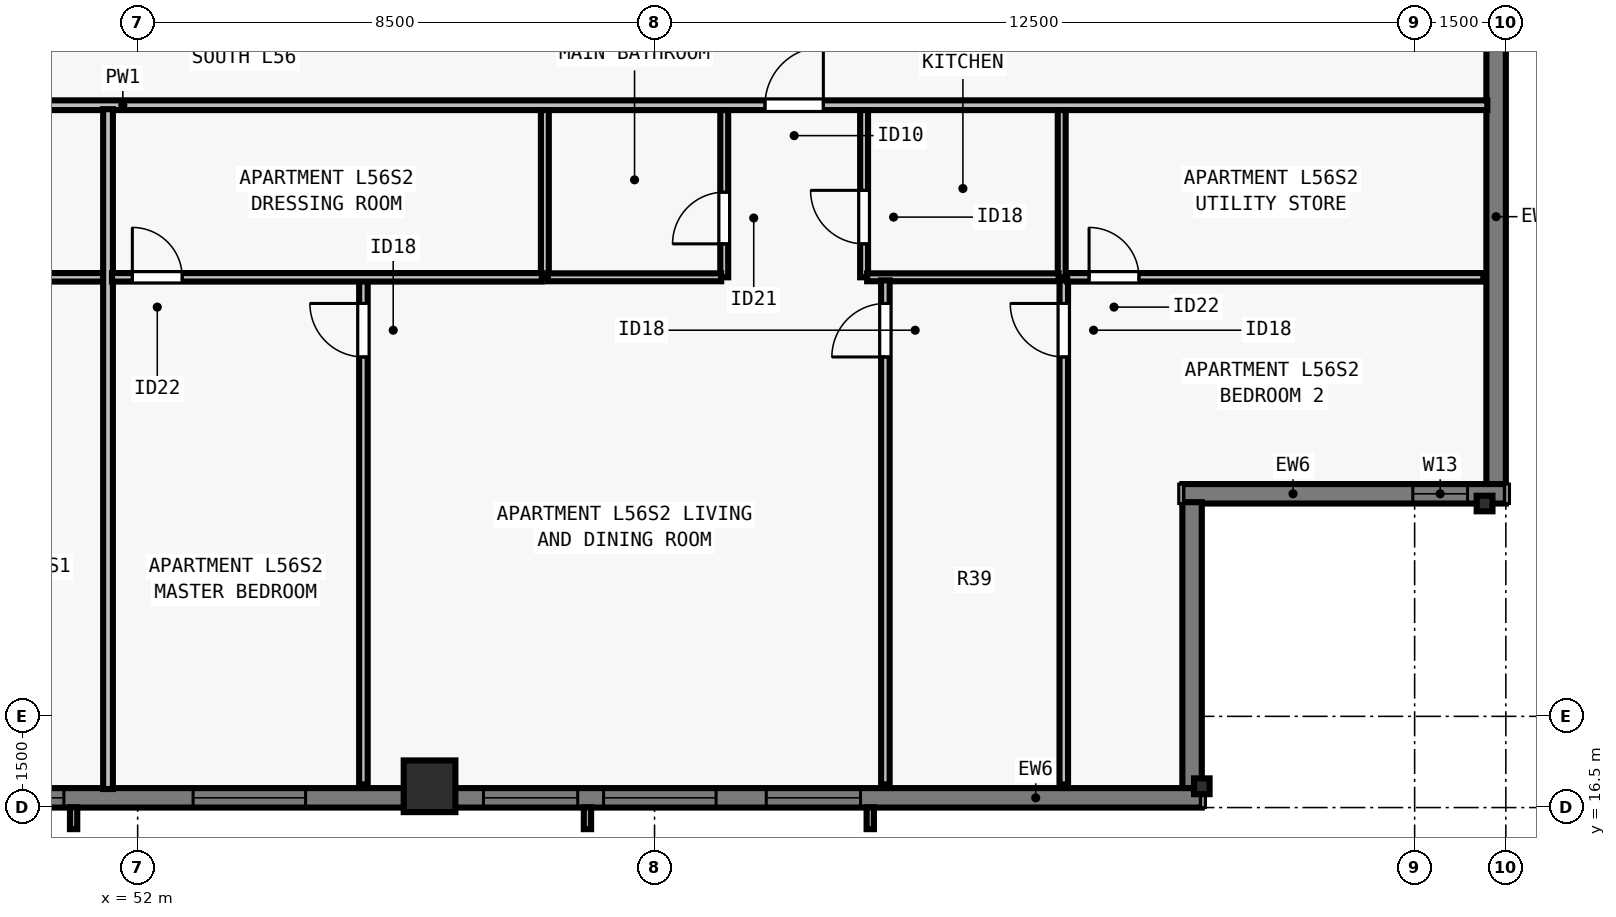
"""IFC4 building model, lengths in metres.
Left out: names, types, materials, properties, quantities, classifications, styles, units other than length and angle.
Written with IfcOpenShell. Run it as: python <this file> out.ifc"""

import sys

from ifc_helpers import new_model, si_unit, direction, frame, frame_2d, origin, origin_2d, place, context, subcontext, project, spatial, rectangle, i_section, extrude, element, fill, save


model = new_model("IFC4")
c1 = context("Model", 3, precision=1e-05, world=origin(), true_north=direction((0.0, 1.0)))
c2 = subcontext(c1, "Body", "Model", "MODEL_VIEW")
j1 = project(units=[si_unit("LENGTHUNIT", "METRE"), si_unit("PLANEANGLEUNIT", "RADIAN")], contexts=[c1])
p1 = place(None, origin())
s1 = spatial("IfcSite", under=j1, at=p1, CompositionType="ELEMENT")
p2 = place(p1, origin())
s2 = spatial("IfcBuilding", under=s1, at=p2, CompositionType="ELEMENT")
p3 = place(p2, frame((0.0, 0.0, 206.0)))
s3 = spatial("IfcBuildingStorey", under=s2, at=p3, CompositionType="ELEMENT", Elevation=206.0)
p4 = place(p3, frame((56.8, 16.85, 0.0), z_axis=(0.0, 0.0, 1.0), x_axis=(1.0, 0.0, 0.0)))
e1 = element("IfcColumn", 1, at=p4, inside=s3, PredefinedType="COLUMN", context=c2, shape_type="SweptSolid", body=[
    extrude(rectangle(XDim=0.85, YDim=0.85, at=origin_2d()), origin(), (0.0, 0.0, 1.0), 3.5),
])
for number, where, z_axis, x_axis in (
    (2, (69.5, 16.85, 0.0), (0.0, 0.0, 1.0), (1.0, 0.0, 0.0)),
    (3, (74.15, 21.5, 0.0), (0.0, 0.0, 1.0), (0.0, 1.0, 0.0)),
):
    element("IfcColumn", number, at=place(p3, frame(where, z_axis=z_axis, x_axis=x_axis)), inside=s3, PredefinedType="COLUMN", context=c2, shape_type="SweptSolid", body=[
        extrude(i_section(OverallWidth=0.256, OverallDepth=0.26, WebThickness=0.01, FlangeThickness=0.017, FilletRadius=0.013, at=origin_2d()), origin(), (0.0, 0.0, 1.0), 3.5),
    ])
p5 = place(p3, frame((74.34, 56.5, 0.0), z_axis=(0.0, 0.0, 1.0), x_axis=(0.0, -1.0, 0.0)))
e4 = element("IfcWall", 4, at=p5, inside=s3, PredefinedType="SOLIDWALL", context=c2, shape_type="SweptSolid", body=[
    extrude(rectangle(XDim=34.702, YDim=0.32, at=frame_2d((17.351, 0.0))), origin(), (0.0, 0.0, 1.0), 3.29),
])
p6 = place(p5, frame((4.312, 0.0, 0.8)))
e5 = element("IfcOpeningElement", 5, at=p6, cuts=e4, PredefinedType="OPENING", context=c2, shape_type="SweptSolid", body=[
    extrude(rectangle(XDim=1.55, YDim=1.678, at=frame_2d((0.775, 0.839))), frame((0.0, 0.17, 0.0), z_axis=(0.0, -1.0, 0.0), x_axis=(1.0, 0.0, 0.0)), (0.0, 0.0, 1.0), 0.34),
])
p7 = place(p5, frame((9.238, 0.0, 0.8)))
e6 = element("IfcOpeningElement", 6, at=p7, cuts=e4, PredefinedType="OPENING", context=c2, shape_type="SweptSolid", body=[
    extrude(rectangle(XDim=1.85, YDim=1.678, at=frame_2d((0.925, 0.839))), frame((0.0, 0.17, 0.0), z_axis=(0.0, -1.0, 0.0), x_axis=(1.0, 0.0, 0.0)), (0.0, 0.0, 1.0), 0.34),
])
p8 = place(p5, frame((14.738, 0.0, 0.8)))
e7 = element("IfcOpeningElement", 7, at=p8, cuts=e4, PredefinedType="OPENING", context=c2, shape_type="SweptSolid", body=[
    extrude(rectangle(XDim=1.85, YDim=1.678, at=frame_2d((0.925, 0.839))), frame((0.0, 0.17, 0.0), z_axis=(0.0, -1.0, 0.0), x_axis=(1.0, 0.0, 0.0)), (0.0, 0.0, 1.0), 0.34),
])
p9 = place(p5, frame((18.264, 0.0, 0.8)))
e8 = element("IfcOpeningElement", 8, at=p9, cuts=e4, PredefinedType="OPENING", context=c2, shape_type="SweptSolid", body=[
    extrude(rectangle(XDim=1.55, YDim=1.678, at=frame_2d((0.775, 0.839))), frame((0.0, 0.17, 0.0), z_axis=(0.0, -1.0, 0.0), x_axis=(1.0, 0.0, 0.0)), (0.0, 0.0, 1.0), 0.34),
])
p10 = place(p5, frame((24.164, 0.0, 0.8)))
e9 = element("IfcOpeningElement", 9, at=p10, cuts=e4, PredefinedType="OPENING", context=c2, shape_type="SweptSolid", body=[
    extrude(rectangle(XDim=1.55, YDim=1.678, at=frame_2d((0.775, 0.839))), frame((0.0, 0.17, 0.0), z_axis=(0.0, -1.0, 0.0), x_axis=(1.0, 0.0, 0.0)), (0.0, 0.0, 1.0), 0.34),
])
p11 = place(p3, frame((74.5, 21.66, 0.0), z_axis=(0.0, 0.0, 1.0), x_axis=(-1.0, 0.0, 0.0)))
e10 = element("IfcWall", 10, at=p11, inside=s3, PredefinedType="SOLIDWALL", context=c2, shape_type="SweptSolid", body=[
    extrude(rectangle(XDim=5.32, YDim=0.32, at=frame_2d((2.66, 0.0))), origin(), (0.0, 0.0, 1.0), 3.29),
])
p12 = place(p11, frame((0.63, 0.0, 0.8)))
e11 = element("IfcOpeningElement", 11, at=p12, cuts=e10, PredefinedType="OPENING", context=c2, shape_type="SweptSolid", body=[
    extrude(rectangle(XDim=0.9, YDim=1.678, at=frame_2d((0.45, 0.839))), frame((0.0, 0.17, 0.0), z_axis=(0.0, -1.0, 0.0), x_axis=(1.0, 0.0, 0.0)), (0.0, 0.0, 1.0), 0.34),
])
p13 = place(p3, frame((69.34, 21.522, 0.0), z_axis=(0.0, 0.0, 1.0), x_axis=(0.0, -1.0, 0.0)))
e12 = element("IfcWall", 12, at=p13, inside=s3, PredefinedType="SOLIDWALL", context=c2, shape_type="SweptSolid", body=[
    extrude(rectangle(XDim=4.724, YDim=0.32, at=frame_2d((2.362, 0.0))), origin(), (0.0, 0.0, 1.0), 3.29),
])
p14 = place(p3, frame((69.5, 16.66, 0.0), z_axis=(0.0, 0.0, 1.0), x_axis=(-1.0, 0.0, 0.0)))
e13 = element("IfcWall", 13, at=p14, inside=s3, PredefinedType="SOLIDWALL", context=c2, shape_type="SweptSolid", body=[
    extrude(rectangle(XDim=34.702, YDim=0.32, at=frame_2d((17.351, 0.0))), origin(), (0.0, 0.0, 1.0), 3.29),
])
p15 = place(p14, frame((5.613, 0.0, 0.8)))
e14 = element("IfcOpeningElement", 14, at=p15, cuts=e13, PredefinedType="OPENING", context=c2, shape_type="SweptSolid", body=[
    extrude(rectangle(XDim=1.55, YDim=1.678, at=frame_2d((0.775, 0.839))), frame((0.0, 0.17, 0.0), z_axis=(0.0, -1.0, 0.0), x_axis=(1.0, 0.0, 0.0)), (0.0, 0.0, 1.0), 0.34),
])
p16 = place(p14, frame((7.988, 0.0, 0.8)))
e15 = element("IfcOpeningElement", 15, at=p16, cuts=e13, PredefinedType="OPENING", context=c2, shape_type="SweptSolid", body=[
    extrude(rectangle(XDim=1.85, YDim=1.678, at=frame_2d((0.925, 0.839))), frame((0.0, 0.17, 0.0), z_axis=(0.0, -1.0, 0.0), x_axis=(1.0, 0.0, 0.0)), (0.0, 0.0, 1.0), 0.34),
])
p17 = place(p14, frame((10.263, 0.0, 0.8)))
e16 = element("IfcOpeningElement", 16, at=p17, cuts=e13, PredefinedType="OPENING", context=c2, shape_type="SweptSolid", body=[
    extrude(rectangle(XDim=1.55, YDim=1.678, at=frame_2d((0.775, 0.839))), frame((0.0, 0.17, 0.0), z_axis=(0.0, -1.0, 0.0), x_axis=(1.0, 0.0, 0.0)), (0.0, 0.0, 1.0), 0.34),
])
p18 = place(p14, frame((14.738, 0.0, 0.8)))
e17 = element("IfcOpeningElement", 17, at=p18, cuts=e13, PredefinedType="OPENING", context=c2, shape_type="SweptSolid", body=[
    extrude(rectangle(XDim=1.85, YDim=1.678, at=frame_2d((0.925, 0.839))), frame((0.0, 0.17, 0.0), z_axis=(0.0, -1.0, 0.0), x_axis=(1.0, 0.0, 0.0)), (0.0, 0.0, 1.0), 0.34),
])
p19 = place(p14, frame((18.714, 0.0, 0.8)))
e18 = element("IfcOpeningElement", 18, at=p19, cuts=e13, PredefinedType="OPENING", context=c2, shape_type="SweptSolid", body=[
    extrude(rectangle(XDim=1.55, YDim=1.678, at=frame_2d((0.775, 0.839))), frame((0.0, 0.17, 0.0), z_axis=(0.0, -1.0, 0.0), x_axis=(1.0, 0.0, 0.0)), (0.0, 0.0, 1.0), 0.34),
])
p20 = place(p14, frame((24.564, 0.0, 0.8)))
e19 = element("IfcOpeningElement", 19, at=p20, cuts=e13, PredefinedType="OPENING", context=c2, shape_type="SweptSolid", body=[
    extrude(rectangle(XDim=1.55, YDim=1.678, at=frame_2d((0.775, 0.839))), frame((0.0, 0.17, 0.0), z_axis=(0.0, -1.0, 0.0), x_axis=(1.0, 0.0, 0.0)), (0.0, 0.0, 1.0), 0.34),
])
p21 = place(p14, frame((28.24, 0.0, 0.8)))
e20 = element("IfcOpeningElement", 20, at=p21, cuts=e13, PredefinedType="OPENING", context=c2, shape_type="SweptSolid", body=[
    extrude(rectangle(XDim=1.85, YDim=1.678, at=frame_2d((0.925, 0.839))), frame((0.0, 0.17, 0.0), z_axis=(0.0, -1.0, 0.0), x_axis=(1.0, 0.0, 0.0)), (0.0, 0.0, 1.0), 0.34),
])
p22 = place(p3, frame((29.805, 28.05, 0.0), z_axis=(0.0, 0.0, 1.0), x_axis=(1.0, 0.0, 0.0)))
e21 = element("IfcWall", 21, at=p22, inside=s3, PredefinedType="PARTITIONING", context=c2, shape_type="SweptSolid", body=[
    extrude(rectangle(XDim=44.39, YDim=0.16, at=frame_2d((22.195, 0.0))), origin(), (0.0, 0.0, 1.0), 2.958),
])
p23 = place(p22, frame((10.431, 0.0, 0.0)))
e22 = element("IfcOpeningElement", 22, at=p23, cuts=e21, PredefinedType="OPENING", context=c2, shape_type="SweptSolid", body=[
    extrude(rectangle(XDim=0.96, YDim=2.18, at=frame_2d((0.48, 1.09))), frame((0.0, 0.09, 0.0), z_axis=(0.0, -1.0, 0.0), x_axis=(1.0, 0.0, 0.0)), (0.0, 0.0, 1.0), 0.18),
])
p24 = place(p22, frame((32.511, 0.0, 0.0)))
e23 = element("IfcOpeningElement", 23, at=p24, cuts=e21, PredefinedType="OPENING", context=c2, shape_type="SweptSolid", body=[
    extrude(rectangle(XDim=0.96, YDim=2.18, at=frame_2d((0.48, 1.09))), frame((0.0, 0.09, 0.0), z_axis=(0.0, -1.0, 0.0), x_axis=(1.0, 0.0, 0.0)), (0.0, 0.0, 1.0), 0.18),
])
p25 = place(p3, frame((45.166, 25.22, 0.0), z_axis=(0.0, 0.0, 1.0), x_axis=(1.0, 0.0, 0.0)))
e24 = element("IfcWall", 24, at=p25, inside=s3, PredefinedType="PARTITIONING", context=c2, shape_type="SweptSolid", body=[
    extrude(rectangle(XDim=6.396, YDim=0.14, at=frame_2d((3.198, 0.0))), origin(), (0.0, 0.0, 1.0), 3.29),
])
p26 = place(p25, frame((0.4, 0.0, 0.0)))
e25 = element("IfcOpeningElement", 25, at=p26, cuts=e24, PredefinedType="OPENING", context=c2, shape_type="SweptSolid", body=[
    extrude(rectangle(XDim=0.82, YDim=2.1, at=frame_2d((0.41, 1.05))), frame((0.0, 0.08, 0.0), z_axis=(0.0, -1.0, 0.0), x_axis=(1.0, 0.0, 0.0)), (0.0, 0.0, 1.0), 0.16),
])
p27 = place(p3, frame((51.512, 16.805, 0.0), z_axis=(0.0, 0.0, 1.0), x_axis=(0.0, 1.0, 0.0)))
e26 = element("IfcWall", 26, at=p27, inside=s3, PredefinedType="PARTITIONING", context=c2, shape_type="SweptSolid", body=[
    extrude(rectangle(XDim=11.18, YDim=0.16, at=frame_2d((5.59, 0.0))), origin(), (0.0, 0.0, 1.0), 2.958),
])
p28 = place(p3, frame((58.696, 25.22, 0.0), z_axis=(0.0, 0.0, 1.0), x_axis=(0.0, 1.0, 0.0)))
e27 = element("IfcWall", 27, at=p28, inside=s3, PredefinedType="PLUMBINGWALL", context=c2, shape_type="SweptSolid", body=[
    extrude(rectangle(XDim=2.75, YDim=0.13, at=frame_2d((1.375, 0.0))), origin(), (0.0, 0.0, 1.0), 3.29),
])
p29 = place(p3, frame((61.646, 25.22, 0.0), z_axis=(0.0, 0.0, 1.0), x_axis=(0.0, 1.0, 0.0)))
e28 = element("IfcWall", 28, at=p29, inside=s3, PredefinedType="PLUMBINGWALL", context=c2, shape_type="SweptSolid", body=[
    extrude(rectangle(XDim=2.75, YDim=0.13, at=frame_2d((1.375, 0.0))), origin(), (0.0, 0.0, 1.0), 3.29),
])
p30 = place(p29, frame((0.55, 0.0, 0.0)))
e29 = element("IfcOpeningElement", 29, at=p30, cuts=e28, PredefinedType="OPENING", context=c2, shape_type="SweptSolid", body=[
    extrude(rectangle(XDim=0.85, YDim=2.08, at=frame_2d((0.425, 1.04))), frame((0.0, 0.075, 0.0), z_axis=(0.0, -1.0, 0.0), x_axis=(1.0, 0.0, 0.0)), (0.0, 0.0, 1.0), 0.15),
])
p31 = place(p3, frame((58.746, 25.22, 0.0), z_axis=(0.0, 0.0, 1.0), x_axis=(1.0, 0.0, 0.0)))
e30 = element("IfcWall", 30, at=p31, inside=s3, PredefinedType="PLUMBINGWALL", context=c2, shape_type="SweptSolid", body=[
    extrude(rectangle(XDim=2.85, YDim=0.13, at=frame_2d((1.425, 0.0))), origin(), (0.0, 0.0, 1.0), 3.29),
])
p32 = place(p3, frame((67.196, 25.22, 0.0), z_axis=(0.0, 0.0, 1.0), x_axis=(0.0, 1.0, 0.0)))
e31 = element("IfcWall", 31, at=p32, inside=s3, PredefinedType="PLUMBINGWALL", context=c2, shape_type="SweptSolid", body=[
    extrude(rectangle(XDim=2.75, YDim=0.13, at=frame_2d((1.375, 0.0))), origin(), (0.0, 0.0, 1.0), 3.29),
])
p33 = place(p3, frame((63.946, 25.22, 0.0), z_axis=(0.0, 0.0, 1.0), x_axis=(0.0, 1.0, 0.0)))
e32 = element("IfcWall", 32, at=p33, inside=s3, PredefinedType="PLUMBINGWALL", context=c2, shape_type="SweptSolid", body=[
    extrude(rectangle(XDim=2.75, YDim=0.13, at=frame_2d((1.375, 0.0))), origin(), (0.0, 0.0, 1.0), 2.573),
])
p34 = place(p33, frame((0.55, 0.0, 0.0)))
e33 = element("IfcOpeningElement", 33, at=p34, cuts=e32, PredefinedType="OPENING", context=c2, shape_type="SweptSolid", body=[
    extrude(rectangle(XDim=0.88, YDim=2.1, at=frame_2d((0.44, 1.05))), frame((0.0, 0.075, 0.0), z_axis=(0.0, -1.0, 0.0), x_axis=(1.0, 0.0, 0.0)), (0.0, 0.0, 1.0), 0.15),
])
p35 = place(p3, frame((63.996, 25.22, 0.0), z_axis=(0.0, 0.0, 1.0), x_axis=(1.0, 0.0, 0.0)))
e34 = element("IfcWall", 34, at=p35, inside=s3, PredefinedType="PLUMBINGWALL", context=c2, shape_type="SweptSolid", body=[
    extrude(rectangle(XDim=3.15, YDim=0.13, at=frame_2d((1.575, 0.0))), origin(), (0.0, 0.0, 1.0), 3.29),
])
p36 = place(p3, frame((55.712, 16.88, 0.0), z_axis=(0.0, 0.0, 1.0), x_axis=(0.0, 1.0, 0.0)))
e35 = element("IfcWall", 35, at=p36, inside=s3, PredefinedType="PARTITIONING", context=c2, shape_type="SweptSolid", body=[
    extrude(rectangle(XDim=8.38, YDim=0.14, at=frame_2d((4.19, 0.0))), origin(), (0.0, 0.0, 1.0), 3.29),
])
p37 = place(p36, frame((7.03, 0.0, 0.0)))
e36 = element("IfcOpeningElement", 36, at=p37, cuts=e35, PredefinedType="OPENING", context=c2, shape_type="SweptSolid", body=[
    extrude(rectangle(XDim=0.88, YDim=2.1, at=frame_2d((0.44, 1.05))), frame((0.0, 0.08, 0.0), z_axis=(0.0, -1.0, 0.0), x_axis=(1.0, 0.0, 0.0)), (0.0, 0.0, 1.0), 0.16),
])
p38 = place(p3, frame((51.577, 25.22, 0.0), z_axis=(0.0, 0.0, 1.0), x_axis=(1.0, 0.0, 0.0)))
e37 = element("IfcWall", 37, at=p38, inside=s3, PredefinedType="PARTITIONING", context=c2, shape_type="SweptSolid", body=[
    extrude(rectangle(XDim=7.069, YDim=0.14, at=frame_2d((3.534, 0.0))), origin(), (0.0, 0.0, 1.0), 3.29),
])
p39 = place(p38, frame((0.335, 0.0, 0.0)))
e38 = element("IfcOpeningElement", 38, at=p39, cuts=e37, PredefinedType="OPENING", context=c2, shape_type="SweptSolid", body=[
    extrude(rectangle(XDim=0.82, YDim=2.1, at=frame_2d((0.41, 1.05))), frame((0.0, 0.08, 0.0), z_axis=(0.0, -1.0, 0.0), x_axis=(1.0, 0.0, 0.0)), (0.0, 0.0, 1.0), 0.16),
])
p40 = place(p3, frame((67.23, 16.88, 0.0), z_axis=(0.0, 0.0, 1.0), x_axis=(0.0, 1.0, 0.0)))
e39 = element("IfcWall", 39, at=p40, inside=s3, PredefinedType="PARTITIONING", context=c2, shape_type="SweptSolid", body=[
    extrude(rectangle(XDim=8.29, YDim=0.14, at=frame_2d((4.145, 0.0))), origin(), (0.0, 0.0, 1.0), 2.573),
])
p41 = place(p40, frame((7.03, 0.0, 0.0)))
e40 = element("IfcOpeningElement", 40, at=p41, cuts=e39, PredefinedType="OPENING", context=c2, shape_type="SweptSolid", body=[
    extrude(rectangle(XDim=0.88, YDim=2.1, at=frame_2d((0.44, 1.05))), frame((0.0, 0.08, 0.0), z_axis=(0.0, -1.0, 0.0), x_axis=(1.0, 0.0, 0.0)), (0.0, 0.0, 1.0), 0.16),
])
p42 = place(p3, frame((67.285, 25.22, 0.0), z_axis=(0.0, 0.0, 1.0), x_axis=(1.0, 0.0, 0.0)))
e41 = element("IfcWall", 41, at=p42, inside=s3, PredefinedType="PARTITIONING", context=c2, shape_type="SweptSolid", body=[
    extrude(rectangle(XDim=6.845, YDim=0.14, at=frame_2d((3.422, 0.0))), origin(), (0.0, 0.0, 1.0), 2.958),
])
p43 = place(p42, frame((0.361, 0.0, 0.0)))
e42 = element("IfcOpeningElement", 42, at=p43, cuts=e41, PredefinedType="OPENING", context=c2, shape_type="SweptSolid", body=[
    extrude(rectangle(XDim=0.82, YDim=2.1, at=frame_2d((0.41, 1.05))), frame((0.0, 0.08, 0.0), z_axis=(0.0, -1.0, 0.0), x_axis=(1.0, 0.0, 0.0)), (0.0, 0.0, 1.0), 0.16),
])
p44 = place(p3, frame((64.296, 16.88, 0.0), z_axis=(0.0, 0.0, 1.0), x_axis=(0.0, 1.0, 0.0)))
e43 = element("IfcWall", 43, at=p44, inside=s3, PredefinedType="PARTITIONING", context=c2, shape_type="SweptSolid", body=[
    extrude(rectangle(XDim=8.29, YDim=0.14, at=frame_2d((4.145, 0.0))), origin(), (0.0, 0.0, 1.0), 2.573),
])
p45 = place(p44, frame((7.03, 0.0, 0.0)))
e44 = element("IfcOpeningElement", 44, at=p45, cuts=e43, PredefinedType="OPENING", context=c2, shape_type="SweptSolid", body=[
    extrude(rectangle(XDim=0.88, YDim=2.1, at=frame_2d((0.44, 1.05))), frame((0.0, 0.08, 0.0), z_axis=(0.0, -1.0, 0.0), x_axis=(1.0, 0.0, 0.0)), (0.0, 0.0, 1.0), 0.16),
])
p46 = place(p15, origin())
e45 = element("IfcWindow", 45, at=p46, inside=s3, PartitioningType="SINGLE_PANEL", PredefinedType="WINDOW", context=c2, shape_type="SweptSolid", body=[
    extrude(rectangle(XDim=1.55, YDim=1.678, at=frame_2d((0.775, 0.839))), frame((0.0, -0.05, 0.0), z_axis=(0.0, -1.0, 0.0), x_axis=(1.0, 0.0, 0.0)), (0.0, 0.0, 1.0), 0.06),
])
fill(e14, e45)
p47 = place(p16, origin())
e46 = element("IfcWindow", 46, at=p47, inside=s3, PartitioningType="SINGLE_PANEL", PredefinedType="WINDOW", context=c2, shape_type="SweptSolid", body=[
    extrude(rectangle(XDim=1.85, YDim=1.678, at=frame_2d((0.925, 0.839))), frame((0.0, -0.05, 0.0), z_axis=(0.0, -1.0, 0.0), x_axis=(1.0, 0.0, 0.0)), (0.0, 0.0, 1.0), 0.06),
])
fill(e15, e46)
p48 = place(p17, origin())
e47 = element("IfcWindow", 47, at=p48, inside=s3, PartitioningType="SINGLE_PANEL", PredefinedType="WINDOW", context=c2, shape_type="SweptSolid", body=[
    extrude(rectangle(XDim=1.55, YDim=1.678, at=frame_2d((0.775, 0.839))), frame((0.0, -0.05, 0.0), z_axis=(0.0, -1.0, 0.0), x_axis=(1.0, 0.0, 0.0)), (0.0, 0.0, 1.0), 0.06),
])
fill(e16, e47)
p49 = place(p18, origin())
e48 = element("IfcWindow", 48, at=p49, inside=s3, PartitioningType="SINGLE_PANEL", PredefinedType="WINDOW", context=c2, shape_type="SweptSolid", body=[
    extrude(rectangle(XDim=1.85, YDim=1.678, at=frame_2d((0.925, 0.839))), frame((0.0, -0.05, 0.0), z_axis=(0.0, -1.0, 0.0), x_axis=(1.0, 0.0, 0.0)), (0.0, 0.0, 1.0), 0.06),
])
fill(e17, e48)
p50 = place(p19, origin())
e49 = element("IfcWindow", 49, at=p50, inside=s3, PartitioningType="SINGLE_PANEL", PredefinedType="WINDOW", context=c2, shape_type="SweptSolid", body=[
    extrude(rectangle(XDim=1.55, YDim=1.678, at=frame_2d((0.775, 0.839))), frame((0.0, -0.05, 0.0), z_axis=(0.0, -1.0, 0.0), x_axis=(1.0, 0.0, 0.0)), (0.0, 0.0, 1.0), 0.06),
])
fill(e18, e49)
p51 = place(p12, origin())
e50 = element("IfcWindow", 50, at=p51, inside=s3, PartitioningType="SINGLE_PANEL", PredefinedType="WINDOW", context=c2, shape_type="SweptSolid", body=[
    extrude(rectangle(XDim=0.9, YDim=1.678, at=frame_2d((0.45, 0.839))), frame((0.0, -0.04, 0.0), z_axis=(0.0, -1.0, 0.0), x_axis=(1.0, 0.0, 0.0)), (0.0, 0.0, 1.0), 0.06),
])
fill(e11, e50)
p52 = place(p30, origin())
e51 = element("IfcDoor", 51, at=p52, inside=s3, OperationType="SINGLE_SWING_LEFT", PredefinedType="DOOR", context=c2, shape_type="SweptSolid", body=[
    extrude(rectangle(XDim=0.85, YDim=2.08, at=frame_2d((0.425, 1.04))), frame((0.0, 0.025, 0.0), z_axis=(0.0, -1.0, 0.0), x_axis=(1.0, 0.0, 0.0)), (0.0, 0.0, 1.0), 0.05),
])
fill(e29, e51)
p53 = place(p34, origin())
e52 = element("IfcDoor", 52, at=p53, inside=s3, OperationType="SINGLE_SWING_RIGHT", PredefinedType="DOOR", context=c2, shape_type="SweptSolid", body=[
    extrude(rectangle(XDim=0.88, YDim=2.1, at=frame_2d((0.44, 1.05))), frame((0.0, 0.025, 0.0), z_axis=(0.0, -1.0, 0.0), x_axis=(1.0, 0.0, 0.0)), (0.0, 0.0, 1.0), 0.05),
])
fill(e33, e52)
p54 = place(p39, origin())
e53 = element("IfcDoor", 53, at=p54, inside=s3, OperationType="SINGLE_SWING_LEFT", PredefinedType="DOOR", context=c2, shape_type="SweptSolid", body=[
    extrude(rectangle(XDim=0.82, YDim=2.1, at=frame_2d((0.41, 1.05))), frame((0.0, 0.025, 0.0), z_axis=(0.0, -1.0, 0.0), x_axis=(1.0, 0.0, 0.0)), (0.0, 0.0, 1.0), 0.05),
])
fill(e38, e53)
p55 = place(p37, origin())
e54 = element("IfcDoor", 54, at=p55, inside=s3, OperationType="SINGLE_SWING_RIGHT", PredefinedType="DOOR", context=c2, shape_type="SweptSolid", body=[
    extrude(rectangle(XDim=0.88, YDim=2.1, at=frame_2d((0.44, 1.05))), frame((0.0, 0.025, 0.0), z_axis=(0.0, -1.0, 0.0), x_axis=(1.0, 0.0, 0.0)), (0.0, 0.0, 1.0), 0.05),
])
fill(e36, e54)
p56 = place(p43, origin())
e55 = element("IfcDoor", 55, at=p56, inside=s3, OperationType="SINGLE_SWING_LEFT", PredefinedType="DOOR", context=c2, shape_type="SweptSolid", body=[
    extrude(rectangle(XDim=0.82, YDim=2.1, at=frame_2d((0.41, 1.05))), frame((0.0, 0.025, 0.0), z_axis=(0.0, -1.0, 0.0), x_axis=(1.0, 0.0, 0.0)), (0.0, 0.0, 1.0), 0.05),
])
fill(e42, e55)
p57 = place(p41, origin())
e56 = element("IfcDoor", 56, at=p57, inside=s3, OperationType="SINGLE_SWING_RIGHT", PredefinedType="DOOR", context=c2, shape_type="SweptSolid", body=[
    extrude(rectangle(XDim=0.88, YDim=2.1, at=frame_2d((0.44, 1.05))), frame((0.0, 0.025, 0.0), z_axis=(0.0, -1.0, 0.0), x_axis=(1.0, 0.0, 0.0)), (0.0, 0.0, 1.0), 0.05),
])
fill(e40, e56)
p58 = place(p45, origin())
e57 = element("IfcDoor", 57, at=p58, inside=s3, OperationType="SINGLE_SWING_LEFT", PredefinedType="DOOR", context=c2, shape_type="SweptSolid", body=[
    extrude(rectangle(XDim=0.88, YDim=2.1, at=frame_2d((0.44, 1.05))), frame((0.0, 0.025, 0.0), z_axis=(0.0, -1.0, 0.0), x_axis=(1.0, 0.0, 0.0)), (0.0, 0.0, 1.0), 0.05),
])
fill(e44, e57)
p59 = place(p24, origin())
e58 = element("IfcDoor", 58, at=p59, inside=s3, OperationType="SINGLE_SWING_RIGHT", PredefinedType="DOOR", context=c2, shape_type="SweptSolid", body=[
    extrude(rectangle(XDim=0.96, YDim=2.18, at=frame_2d((0.48, 1.09))), frame((0.0, 0.025, 0.0), z_axis=(0.0, -1.0, 0.0), x_axis=(1.0, 0.0, 0.0)), (0.0, 0.0, 1.0), 0.05),
])
fill(e23, e58)
save(model, sys.argv[1])
